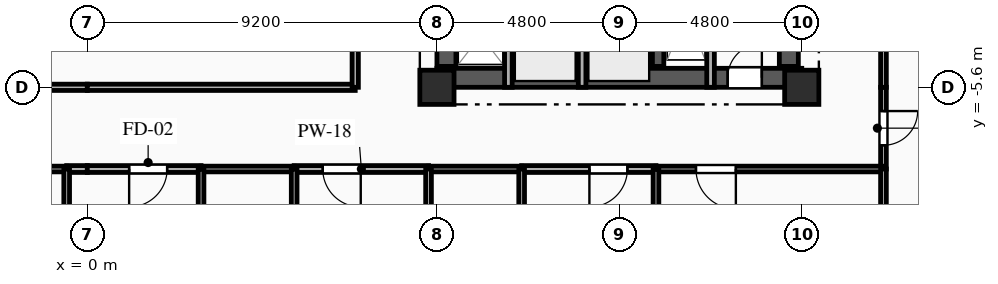
"""IFC4 building model, lengths in metres.
Left out: names, types, materials, properties, quantities, classifications, styles, units other than length and angle.
Written with IfcOpenShell. Run it as: python <this file> out.ifc"""

import sys

from ifc_helpers import new_model, si_unit, direction, frame, frame_2d, origin, origin_2d, place, context, subcontext, project, spatial, rectangle, extrude, element, fill, save


model = new_model("IFC4")
c1 = context("Model", 3, precision=1e-05, world=origin(), true_north=direction((0.0, 1.0)))
c2 = subcontext(c1, "Body", "Model", "MODEL_VIEW")
j1 = project(units=[si_unit("LENGTHUNIT", "METRE"), si_unit("PLANEANGLEUNIT", "RADIAN")], contexts=[c1])
p1 = place(None, origin())
s1 = spatial("IfcSite", under=j1, at=p1, CompositionType="ELEMENT")
p2 = place(p1, origin())
s2 = spatial("IfcBuilding", under=s1, at=p2, CompositionType="ELEMENT")
p3 = place(p2, frame((0.0, 0.0, 151.1)))
s3 = spatial("IfcBuildingStorey", under=s2, at=p3, CompositionType="ELEMENT", Elevation=151.1)
for number, where, z_axis, x_axis in (
    (1, (9.2, -5.6, 0.0), (0.0, 0.0, 1.0), (1.0, 0.0, 0.0)),
    (2, (18.8, -5.6, 0.0), (0.0, 0.0, 1.0), (1.0, 0.0, 0.0)),
):
    element("IfcColumn", number, at=place(p3, frame(where, z_axis=z_axis, x_axis=x_axis)), inside=s3, PredefinedType="COLUMN", context=c2, shape_type="SweptSolid", body=[
        extrude(rectangle(XDim=0.9, YDim=0.9, at=origin_2d()), origin(), (0.0, 0.0, 1.0), 3.35),
    ])
p4 = place(p3, frame((9.2, -5.35, 0.0), z_axis=(0.0, 0.0, 1.0), x_axis=(1.0, 0.0, 0.0)))
e3 = element("IfcWall", 3, at=p4, inside=s3, PredefinedType="SHEAR", context=c2, shape_type="SweptSolid", body=[
    extrude(rectangle(XDim=9.6, YDim=0.5, at=frame_2d((4.8, 0.0))), origin(), (0.0, 0.0, 1.0), 3.04),
])
p5 = place(p4, frame((7.65, 0.0, 0.0)))
e4 = element("IfcOpeningElement", 4, at=p5, cuts=e3, PredefinedType="OPENING", context=c2, shape_type="SweptSolid", body=[
    extrude(rectangle(XDim=0.9, YDim=2.1, at=frame_2d((0.45, 1.05))), frame((0.0, 0.26, 0.0), z_axis=(0.0, -1.0, 0.0), x_axis=(1.0, 0.0, 0.0)), (0.0, 0.0, 1.0), 0.52),
])
p6 = place(p3, frame((9.45, -5.05, 0.0), z_axis=(0.0, 0.0, 1.0), x_axis=(0.0, 1.0, 0.0)))
e5 = element("IfcWall", 5, at=p6, inside=s3, PredefinedType="SHEAR", context=c2, shape_type="SweptSolid", body=[
    extrude(rectangle(XDim=10.1, YDim=0.5, at=frame_2d((5.05, 0.0))), origin(), (0.0, 0.0, 1.0), 3.04),
])
p7 = place(p6, frame((7.15, 0.0, 0.0)))
e6 = element("IfcOpeningElement", 6, at=p7, cuts=e5, PredefinedType="OPENING", context=c2, shape_type="SweptSolid", body=[
    extrude(rectangle(XDim=0.9, YDim=2.1, at=frame_2d((0.45, 1.05))), frame((0.0, 0.26, 0.0), z_axis=(0.0, -1.0, 0.0), x_axis=(1.0, 0.0, 0.0)), (0.0, 0.0, 1.0), 0.52),
])
p8 = place(p6, frame((2.4, 0.0, 0.0)))
e7 = element("IfcOpeningElement", 7, at=p8, cuts=e5, PredefinedType="OPENING", context=c2, shape_type="SweptSolid", body=[
    extrude(rectangle(XDim=1.2, YDim=2.15, at=frame_2d((0.6, 1.075))), frame((0.0, 0.26, 0.0), z_axis=(0.0, -1.0, 0.0), x_axis=(1.0, 0.0, 0.0)), (0.0, 0.0, 1.0), 0.52),
])
p9 = place(p3, frame((18.46, -5.05, 0.0), z_axis=(0.0, 0.0, 1.0), x_axis=(0.0, 1.0, 0.0)))
e8 = element("IfcWall", 8, at=p9, inside=s3, PredefinedType="SHEAR", context=c2, shape_type="SweptSolid", body=[
    extrude(rectangle(XDim=10.1, YDim=0.5, at=frame_2d((5.05, 0.0))), origin(), (0.0, 0.0, 1.0), 3.04),
])
p10 = place(p3, frame((15.02, -5.05, 0.0), z_axis=(0.0, 0.0, 1.0), x_axis=(0.0, 1.0, 0.0)))
e9 = element("IfcWall", 9, at=p10, inside=s3, PredefinedType="SHEAR", context=c2, shape_type="SweptSolid", body=[
    extrude(rectangle(XDim=10.1, YDim=0.3, at=frame_2d((5.05, 0.0))), origin(), (0.0, 0.0, 1.0), 3.04),
])
p11 = place(p3, frame((16.4, -2.11, 0.0), z_axis=(0.0, 0.0, 1.0), x_axis=(0.0, -1.0, 0.0)))
e10 = element("IfcWall", 10, at=p11, inside=s3, PredefinedType="PARTITIONING", context=c2, shape_type="SweptSolid", body=[
    extrude(rectangle(XDim=3.49, YDim=0.2, at=frame_2d((1.745, 0.0))), origin(), (0.0, 0.0, 1.0), 3.04),
])
for number, where, z_axis, x_axis in (
    (11, (11.08, -5.6, 0.0), (0.0, 0.0, 1.0), (0.0, 1.0, 0.0)),
    (12, (13.02, -5.6, 0.0), (0.0, 0.0, 1.0), (0.0, 1.0, 0.0)),
):
    element("IfcWall", number, at=place(p3, frame(where, z_axis=z_axis, x_axis=x_axis)), inside=s3, PredefinedType="PARTITIONING", context=c2, shape_type="SweptSolid", body=[
        extrude(rectangle(XDim=2.25, YDim=0.2, at=frame_2d((1.125, 0.0))), origin(), (0.0, 0.0, 1.0), 3.04),
    ])
p12 = place(p3, frame((0.0, -7.75, 0.0), z_axis=(0.0, 0.0, 1.0), x_axis=(-1.0, 0.0, 0.0)))
e13 = element("IfcWall", 13, at=p12, inside=s3, PredefinedType="PARTITIONING", context=c2, shape_type="SweptSolid", body=[
    extrude(rectangle(XDim=0.543, YDim=0.18, at=frame_2d((0.271, 0.0))), origin(), (0.0, 0.0, 1.0), 3.04),
])
p13 = place(p3, frame((-0.543, -7.75, 0.0), z_axis=(0.0, 0.0, 1.0), x_axis=(-1.0, 0.0, 0.0)))
e14 = element("IfcWall", 14, at=p13, inside=s3, PredefinedType="PLUMBINGWALL", context=c2, shape_type="SweptSolid", body=[
    extrude(rectangle(XDim=2.45, YDim=0.15, at=frame_2d((1.225, 0.0))), origin(), (0.0, 0.0, 1.0), 3.04),
])
p14 = place(p3, frame((-7.05, -5.6, 0.0), z_axis=(0.0, 0.0, 1.0), x_axis=(1.0, 0.0, 0.0)))
e15 = element("IfcWall", 15, at=p14, inside=s3, PredefinedType="PARTITIONING", context=c2, shape_type="SweptSolid", body=[
    extrude(rectangle(XDim=7.05, YDim=0.165, at=frame_2d((3.525, 0.0))), origin(), (0.0, 0.0, 1.0), 2.525),
])
p15 = place(p3, frame((20.95, -5.6, 0.0), z_axis=(0.0, 0.0, 1.0), x_axis=(0.0, -1.0, 0.0)))
e16 = element("IfcWall", 16, at=p15, inside=s3, PredefinedType="PARTITIONING", context=c2, shape_type="SweptSolid", body=[
    extrude(rectangle(XDim=2.15, YDim=0.15, at=frame_2d((1.075, 0.0))), origin(), (0.0, 0.0, 1.0), 3.04),
])
p16 = place(p15, frame((0.625, 0.0, 0.0)))
e17 = element("IfcOpeningElement", 17, at=p16, cuts=e16, PredefinedType="OPENING", context=c2, shape_type="SweptSolid", body=[
    extrude(rectangle(XDim=0.9, YDim=2.1, at=frame_2d((0.45, 1.05))), frame((0.0, 0.085, 0.0), z_axis=(0.0, -1.0, 0.0), x_axis=(1.0, 0.0, 0.0)), (0.0, 0.0, 1.0), 0.17),
])
p17 = place(p3, frame((2.993, -7.75, 0.0), z_axis=(0.0, 0.0, 1.0), x_axis=(-1.0, 0.0, 0.0)))
e18 = element("IfcWall", 18, at=p17, inside=s3, PredefinedType="PARTITIONING", context=c2, shape_type="SweptSolid", body=[
    extrude(rectangle(XDim=2.993, YDim=0.18, at=frame_2d((1.497, 0.0))), origin(), (0.0, 0.0, 1.0), 3.04),
])
p18 = place(p17, frame((0.892, 0.0, 0.0)))
e19 = element("IfcOpeningElement", 19, at=p18, cuts=e18, PredefinedType="OPENING", context=c2, shape_type="SweptSolid", body=[
    extrude(rectangle(XDim=1.0, YDim=2.15, at=frame_2d((0.5, 1.075))), frame((0.0, 0.1, 0.0), z_axis=(0.0, -1.0, 0.0), x_axis=(1.0, 0.0, 0.0)), (0.0, 0.0, 1.0), 0.2),
])
p19 = place(p3, frame((8.979, -7.75, 0.0), z_axis=(0.0, 0.0, 1.0), x_axis=(-1.0, 0.0, 0.0)))
e20 = element("IfcWall", 20, at=p19, inside=s3, PredefinedType="PARTITIONING", context=c2, shape_type="SweptSolid", body=[
    extrude(rectangle(XDim=3.536, YDim=0.18, at=frame_2d((1.768, 0.0))), origin(), (0.0, 0.0, 1.0), 3.04),
])
p20 = place(p19, frame((1.784, 0.0, 0.0)))
e21 = element("IfcOpeningElement", 21, at=p20, cuts=e20, PredefinedType="OPENING", context=c2, shape_type="SweptSolid", body=[
    extrude(rectangle(XDim=1.0, YDim=2.15, at=frame_2d((0.5, 1.075))), frame((0.0, 0.1, 0.0), z_axis=(0.0, -1.0, 0.0), x_axis=(1.0, 0.0, 0.0)), (0.0, 0.0, 1.0), 0.2),
])
p21 = place(p3, frame((5.443, -7.75, 0.0), z_axis=(0.0, 0.0, 1.0), x_axis=(-1.0, 0.0, 0.0)))
e22 = element("IfcWall", 22, at=p21, inside=s3, PredefinedType="PLUMBINGWALL", context=c2, shape_type="SweptSolid", body=[
    extrude(rectangle(XDim=2.45, YDim=0.15, at=frame_2d((1.225, 0.0))), origin(), (0.0, 0.0, 1.0), 3.04),
])
p22 = place(p3, frame((14.964, -7.75, 0.0), z_axis=(0.0, 0.0, 1.0), x_axis=(-1.0, 0.0, 0.0)))
e23 = element("IfcWall", 23, at=p22, inside=s3, PredefinedType="PARTITIONING", context=c2, shape_type="SweptSolid", body=[
    extrude(rectangle(XDim=3.535, YDim=0.18, at=frame_2d((1.768, 0.0))), origin(), (0.0, 0.0, 1.0), 3.04),
])
p23 = place(p22, frame((0.752, 0.0, 0.0)))
e24 = element("IfcOpeningElement", 24, at=p23, cuts=e23, PredefinedType="OPENING", context=c2, shape_type="SweptSolid", body=[
    extrude(rectangle(XDim=1.0, YDim=2.15, at=frame_2d((0.5, 1.075))), frame((0.0, 0.1, 0.0), z_axis=(0.0, -1.0, 0.0), x_axis=(1.0, 0.0, 0.0)), (0.0, 0.0, 1.0), 0.2),
])
p24 = place(p3, frame((11.429, -7.75, 0.0), z_axis=(0.0, 0.0, 1.0), x_axis=(-1.0, 0.0, 0.0)))
e25 = element("IfcWall", 25, at=p24, inside=s3, PredefinedType="PLUMBINGWALL", context=c2, shape_type="SweptSolid", body=[
    extrude(rectangle(XDim=2.45, YDim=0.15, at=frame_2d((1.225, 0.0))), origin(), (0.0, 0.0, 1.0), 3.04),
])
p25 = place(p3, frame((20.95, -7.75, 0.0), z_axis=(0.0, 0.0, 1.0), x_axis=(-1.0, 0.0, 0.0)))
e26 = element("IfcWall", 26, at=p25, inside=s3, PredefinedType="PARTITIONING", context=c2, shape_type="SweptSolid", body=[
    extrude(rectangle(XDim=5.986, YDim=0.15, at=frame_2d((2.993, 0.0))), origin(), (0.0, 0.0, 1.0), 3.04),
])
p26 = place(p25, frame((3.884, 0.0, 0.0)))
e27 = element("IfcOpeningElement", 27, at=p26, cuts=e26, PredefinedType="OPENING", context=c2, shape_type="SweptSolid", body=[
    extrude(rectangle(XDim=1.05, YDim=2.15, at=frame_2d((0.525, 1.075))), frame((0.0, 0.085, 0.0), z_axis=(0.0, -1.0, 0.0), x_axis=(1.0, 0.0, 0.0)), (0.0, 0.0, 1.0), 0.17),
])
p27 = place(p3, frame((0.0, -5.6, 0.0), z_axis=(0.0, 0.0, 1.0), x_axis=(1.0, 0.0, 0.0)))
e28 = element("IfcWall", 28, at=p27, inside=s3, PredefinedType="PARTITIONING", context=c2, shape_type="SweptSolid", body=[
    extrude(rectangle(XDim=7.05, YDim=0.165, at=frame_2d((3.525, 0.0))), origin(), (0.0, 0.0, 1.0), 2.525),
])
p28 = place(p3, frame((20.95, -3.46, 0.0), z_axis=(0.0, 0.0, 1.0), x_axis=(0.0, -1.0, 0.0)))
e29 = element("IfcWall", 29, at=p28, inside=s3, PredefinedType="PARTITIONING", context=c2, shape_type="SweptSolid", body=[
    extrude(rectangle(XDim=2.14, YDim=0.15, at=frame_2d((1.07, 0.0))), origin(), (0.0, 0.0, 1.0), 3.04),
])
p29 = place(p3, frame((7.05, -5.6, 0.0), z_axis=(0.0, 0.0, 1.0), x_axis=(0.0, 1.0, 0.0)))
e30 = element("IfcWall", 30, at=p29, inside=s3, PredefinedType="PARTITIONING", context=c2, shape_type="SweptSolid", body=[
    extrude(rectangle(XDim=2.65, YDim=0.165, at=frame_2d((1.325, 0.0))), origin(), (0.0, 0.0, 1.0), 3.04),
])
p30 = place(p3, frame((20.95, -15.6, 0.0), z_axis=(0.0, 0.0, 1.0), x_axis=(0.0, 1.0, 0.0)))
e31 = element("IfcWall", 31, at=p30, inside=s3, PredefinedType="PARTITIONING", context=c2, shape_type="SweptSolid", body=[
    extrude(rectangle(XDim=7.85, YDim=0.15, at=frame_2d((3.925, 0.0))), origin(), (0.0, 0.0, 1.0), 3.04),
])
for number, where, z_axis, x_axis in (
    (32, (-0.543, -9.9, 0.0), (0.0, 0.0, 1.0), (0.0, 1.0, 0.0)),
    (33, (2.993, -7.75, 0.0), (0.0, 0.0, 1.0), (0.0, -1.0, 0.0)),
    (34, (5.443, -9.9, 0.0), (0.0, 0.0, 1.0), (0.0, 1.0, 0.0)),
    (35, (8.979, -7.75, 0.0), (0.0, 0.0, 1.0), (0.0, -1.0, 0.0)),
    (36, (11.429, -9.9, 0.0), (0.0, 0.0, 1.0), (0.0, 1.0, 0.0)),
):
    element("IfcWall", number, at=place(p3, frame(where, z_axis=z_axis, x_axis=x_axis)), inside=s3, PredefinedType="PLUMBINGWALL", context=c2, shape_type="SweptSolid", body=[
        extrude(rectangle(XDim=2.15, YDim=0.15, at=frame_2d((1.075, 0.0))), origin(), (0.0, 0.0, 1.0), 3.04),
    ])
p31 = place(p3, frame((14.964, -7.75, 0.0), z_axis=(0.0, 0.0, 1.0), x_axis=(0.0, -1.0, 0.0)))
e37 = element("IfcWall", 37, at=p31, inside=s3, PredefinedType="PARTITIONING", context=c2, shape_type="SweptSolid", body=[
    extrude(rectangle(XDim=7.85, YDim=0.15, at=frame_2d((3.925, 0.0))), origin(), (0.0, 0.0, 1.0), 3.04),
])
p32 = place(p5, origin())
e38 = element("IfcDoor", 38, at=p32, inside=s3, OperationType="SINGLE_SWING_RIGHT", PredefinedType="DOOR", context=c2, shape_type="SweptSolid", body=[
    extrude(rectangle(XDim=0.9, YDim=2.1, at=frame_2d((0.45, 1.05))), frame((0.0, 0.025, 0.0), z_axis=(0.0, -1.0, 0.0), x_axis=(1.0, 0.0, 0.0)), (0.0, 0.0, 1.0), 0.05),
])
fill(e4, e38)
p33 = place(p16, origin())
e39 = element("IfcDoor", 39, at=p33, inside=s3, OperationType="SINGLE_SWING_LEFT", PredefinedType="DOOR", context=c2, shape_type="SweptSolid", body=[
    extrude(rectangle(XDim=0.9, YDim=2.1, at=frame_2d((0.45, 1.05))), frame((0.0, 0.025, 0.0), z_axis=(0.0, -1.0, 0.0), x_axis=(1.0, 0.0, 0.0)), (0.0, 0.0, 1.0), 0.05),
])
fill(e17, e39)
p34 = place(p18, origin())
e40 = element("IfcDoor", 40, at=p34, inside=s3, OperationType="SINGLE_SWING_RIGHT", PredefinedType="DOOR", context=c2, shape_type="SweptSolid", body=[
    extrude(rectangle(XDim=1.0, YDim=2.15, at=frame_2d((0.5, 1.075))), frame((0.0, 0.025, 0.0), z_axis=(0.0, -1.0, 0.0), x_axis=(1.0, 0.0, 0.0)), (0.0, 0.0, 1.0), 0.05),
])
fill(e19, e40)
p35 = place(p20, origin())
e41 = element("IfcDoor", 41, at=p35, inside=s3, OperationType="SINGLE_SWING_LEFT", PredefinedType="DOOR", context=c2, shape_type="SweptSolid", body=[
    extrude(rectangle(XDim=1.0, YDim=2.15, at=frame_2d((0.5, 1.075))), frame((0.0, 0.025, 0.0), z_axis=(0.0, -1.0, 0.0), x_axis=(1.0, 0.0, 0.0)), (0.0, 0.0, 1.0), 0.05),
])
fill(e21, e41)
p36 = place(p23, origin())
e42 = element("IfcDoor", 42, at=p36, inside=s3, OperationType="SINGLE_SWING_RIGHT", PredefinedType="DOOR", context=c2, shape_type="SweptSolid", body=[
    extrude(rectangle(XDim=1.0, YDim=2.15, at=frame_2d((0.5, 1.075))), frame((0.0, 0.025, 0.0), z_axis=(0.0, -1.0, 0.0), x_axis=(1.0, 0.0, 0.0)), (0.0, 0.0, 1.0), 0.05),
])
fill(e24, e42)
p37 = place(p26, origin())
e43 = element("IfcDoor", 43, at=p37, inside=s3, OperationType="SINGLE_SWING_LEFT", PredefinedType="DOOR", context=c2, shape_type="SweptSolid", body=[
    extrude(rectangle(XDim=1.05, YDim=2.15, at=frame_2d((0.525, 1.075))), frame((0.0, 0.025, 0.0), z_axis=(0.0, -1.0, 0.0), x_axis=(1.0, 0.0, 0.0)), (0.0, 0.0, 1.0), 0.05),
])
fill(e27, e43)
save(model, sys.argv[1])
